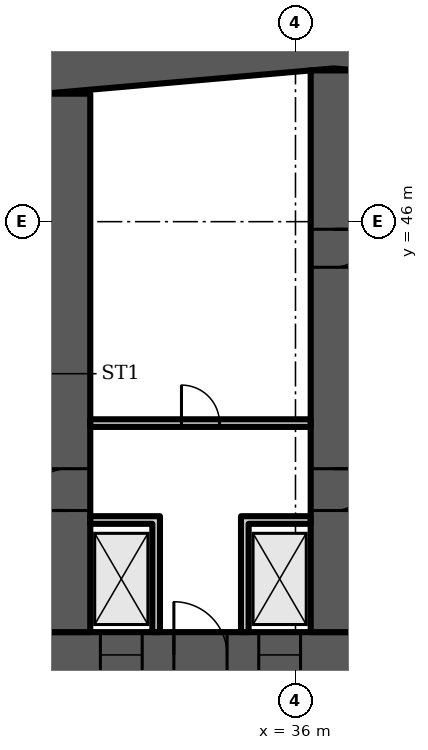
"""IFC4 building model, lengths in metres.
Left out: names, types, materials, properties, quantities, classifications, styles, units other than length and angle.
Written with IfcOpenShell. Run it as: python <this file> out.ifc"""

import sys

from ifc_helpers import new_model, si_unit, direction, frame, frame_2d, origin, place, context, subcontext, project, spatial, polyline, rectangle, outline, extrude, element, fill, save


model = new_model("IFC4")
c1 = context("Model", 3, precision=1e-05, world=origin(), true_north=direction((0.0, 1.0)))
c2 = subcontext(c1, "Body", "Model", "MODEL_VIEW")
j1 = project(units=[si_unit("LENGTHUNIT", "METRE"), si_unit("PLANEANGLEUNIT", "RADIAN")], contexts=[c1])
p1 = place(None, origin())
s1 = spatial("IfcSite", under=j1, at=p1, CompositionType="ELEMENT")
p2 = place(p1, origin())
s2 = spatial("IfcBuilding", under=s1, at=p2, CompositionType="ELEMENT")
p3 = place(p2, frame((0.0, 0.0, 45.1)))
s3 = spatial("IfcBuildingStorey", under=s2, at=p3, CompositionType="ELEMENT", Elevation=45.1)
p4 = place(p3, frame((0.0, 0.0, -0.0)))
e1 = element("IfcWall", 1, at=p4, inside=s3, PredefinedType="SHEAR", context=c2, shape_type="SweptSolid", body=[
    extrude(outline(polyline([(9.0, 47.583), (37.0, 50.032), (65.0, 47.583), (65.0, 48.787), (37.0, 51.237), (9.0, 48.787), (9.0, 47.583)])), origin(), (0.0, 0.0, 1.0), 3.6),
])
p5 = place(p3, frame((9.0, 34.6, 0.0), z_axis=(0.0, 0.0, 1.0), x_axis=(1.0, 0.0, 0.0)))
e2 = element("IfcWall", 2, at=p5, inside=s3, PredefinedType="SHEAR", context=c2, shape_type="SweptSolid", body=[
    extrude(rectangle(XDim=56.0, YDim=1.2, at=frame_2d((28.0, 0.0))), origin(), (0.0, 0.0, 1.0), 3.6),
])
p6 = place(p5, frame((2.0, 0.0, 0.0)))
e3 = element("IfcOpeningElement", 3, at=p6, cuts=e2, PredefinedType="OPENING", context=c2, shape_type="SweptSolid", body=[
    extrude(rectangle(XDim=1.0, YDim=2.1, at=frame_2d((0.5, 1.05))), frame((0.0, 0.61, 0.0), z_axis=(0.0, -1.0, 0.0), x_axis=(1.0, 0.0, 0.0)), (0.0, 0.0, 1.0), 1.22),
])
p7 = place(p5, frame((4.6, 0.0, 0.0)))
e4 = element("IfcOpeningElement", 4, at=p7, cuts=e2, PredefinedType="OPENING", context=c2, shape_type="SweptSolid", body=[
    extrude(rectangle(XDim=1.0, YDim=2.1, at=frame_2d((0.5, 1.05))), frame((0.0, 0.61, 0.0), z_axis=(0.0, -1.0, 0.0), x_axis=(1.0, 0.0, 0.0)), (0.0, 0.0, 1.0), 1.22),
])
p8 = place(p5, frame((7.867, 0.0, 0.0)))
e5 = element("IfcOpeningElement", 5, at=p8, cuts=e2, PredefinedType="OPENING", context=c2, shape_type="SweptSolid", body=[
    extrude(rectangle(XDim=1.1, YDim=2.1, at=frame_2d((0.55, 1.05))), frame((0.0, 0.61, 0.0), z_axis=(0.0, -1.0, 0.0), x_axis=(1.0, 0.0, 0.0)), (0.0, 0.0, 1.0), 1.22),
])
p9 = place(p5, frame((12.033, 0.0, 0.0)))
e6 = element("IfcOpeningElement", 6, at=p9, cuts=e2, PredefinedType="OPENING", context=c2, shape_type="SweptSolid", body=[
    extrude(rectangle(XDim=1.1, YDim=2.1, at=frame_2d((0.55, 1.05))), frame((0.0, 0.61, 0.0), z_axis=(0.0, -1.0, 0.0), x_axis=(1.0, 0.0, 0.0)), (0.0, 0.0, 1.0), 1.22),
])
p10 = place(p5, frame((9.8, 0.0, 0.0)))
e7 = element("IfcOpeningElement", 7, at=p10, cuts=e2, PredefinedType="OPENING", context=c2, shape_type="SweptSolid", body=[
    extrude(rectangle(XDim=1.4, YDim=2.1, at=frame_2d((0.7, 1.05))), frame((0.0, 0.61, 0.0), z_axis=(0.0, -1.0, 0.0), x_axis=(1.0, 0.0, 0.0)), (0.0, 0.0, 1.0), 1.22),
])
p11 = place(p5, frame((14.65, 0.0, 0.0)))
e8 = element("IfcOpeningElement", 8, at=p11, cuts=e2, PredefinedType="OPENING", context=c2, shape_type="SweptSolid", body=[
    extrude(rectangle(XDim=1.2, YDim=2.1, at=frame_2d((0.6, 1.05))), frame((0.0, 0.61, 0.0), z_axis=(0.0, -1.0, 0.0), x_axis=(1.0, 0.0, 0.0)), (0.0, 0.0, 1.0), 1.22),
])
p12 = place(p5, frame((21.867, 0.0, 0.0)))
e9 = element("IfcOpeningElement", 9, at=p12, cuts=e2, PredefinedType="OPENING", context=c2, shape_type="SweptSolid", body=[
    extrude(rectangle(XDim=1.1, YDim=2.1, at=frame_2d((0.55, 1.05))), frame((0.0, 0.61, 0.0), z_axis=(0.0, -1.0, 0.0), x_axis=(1.0, 0.0, 0.0)), (0.0, 0.0, 1.0), 1.22),
])
p13 = place(p5, frame((26.033, 0.0, 0.0)))
e10 = element("IfcOpeningElement", 10, at=p13, cuts=e2, PredefinedType="OPENING", context=c2, shape_type="SweptSolid", body=[
    extrude(rectangle(XDim=1.1, YDim=2.1, at=frame_2d((0.55, 1.05))), frame((0.0, 0.61, 0.0), z_axis=(0.0, -1.0, 0.0), x_axis=(1.0, 0.0, 0.0)), (0.0, 0.0, 1.0), 1.22),
])
p14 = place(p5, frame((23.8, 0.0, 0.0)))
e11 = element("IfcOpeningElement", 11, at=p14, cuts=e2, PredefinedType="OPENING", context=c2, shape_type="SweptSolid", body=[
    extrude(rectangle(XDim=1.4, YDim=2.1, at=frame_2d((0.7, 1.05))), frame((0.0, 0.61, 0.0), z_axis=(0.0, -1.0, 0.0), x_axis=(1.0, 0.0, 0.0)), (0.0, 0.0, 1.0), 1.22),
])
p15 = place(p5, frame((28.867, 0.0, 0.0)))
e12 = element("IfcOpeningElement", 12, at=p15, cuts=e2, PredefinedType="OPENING", context=c2, shape_type="SweptSolid", body=[
    extrude(rectangle(XDim=1.1, YDim=2.1, at=frame_2d((0.55, 1.05))), frame((0.0, 0.61, 0.0), z_axis=(0.0, -1.0, 0.0), x_axis=(1.0, 0.0, 0.0)), (0.0, 0.0, 1.0), 1.22),
])
p16 = place(p5, frame((33.033, 0.0, 0.0)))
e13 = element("IfcOpeningElement", 13, at=p16, cuts=e2, PredefinedType="OPENING", context=c2, shape_type="SweptSolid", body=[
    extrude(rectangle(XDim=1.1, YDim=2.1, at=frame_2d((0.55, 1.05))), frame((0.0, 0.61, 0.0), z_axis=(0.0, -1.0, 0.0), x_axis=(1.0, 0.0, 0.0)), (0.0, 0.0, 1.0), 1.22),
])
p17 = place(p5, frame((40.15, 0.0, 0.0)))
e14 = element("IfcOpeningElement", 14, at=p17, cuts=e2, PredefinedType="OPENING", context=c2, shape_type="SweptSolid", body=[
    extrude(rectangle(XDim=1.2, YDim=2.1, at=frame_2d((0.6, 1.05))), frame((0.0, 0.61, 0.0), z_axis=(0.0, -1.0, 0.0), x_axis=(1.0, 0.0, 0.0)), (0.0, 0.0, 1.0), 1.22),
])
p18 = place(p5, frame((44.8, 0.0, 0.0)))
e15 = element("IfcOpeningElement", 15, at=p18, cuts=e2, PredefinedType="OPENING", context=c2, shape_type="SweptSolid", body=[
    extrude(rectangle(XDim=1.4, YDim=2.1, at=frame_2d((0.7, 1.05))), frame((0.0, 0.61, 0.0), z_axis=(0.0, -1.0, 0.0), x_axis=(1.0, 0.0, 0.0)), (0.0, 0.0, 1.0), 1.22),
])
p19 = place(p5, frame((49.867, 0.0, 0.0)))
e16 = element("IfcOpeningElement", 16, at=p19, cuts=e2, PredefinedType="OPENING", context=c2, shape_type="SweptSolid", body=[
    extrude(rectangle(XDim=1.1, YDim=2.1, at=frame_2d((0.55, 1.05))), frame((0.0, 0.61, 0.0), z_axis=(0.0, -1.0, 0.0), x_axis=(1.0, 0.0, 0.0)), (0.0, 0.0, 1.0), 1.22),
])
p20 = place(p5, frame((53.5, 0.0, 0.0)))
e17 = element("IfcOpeningElement", 17, at=p20, cuts=e2, PredefinedType="OPENING", context=c2, shape_type="SweptSolid", body=[
    extrude(rectangle(XDim=1.1, YDim=2.1, at=frame_2d((0.55, 1.05))), frame((0.0, 0.61, 0.0), z_axis=(0.0, -1.0, 0.0), x_axis=(1.0, 0.0, 0.0)), (0.0, 0.0, 1.0), 1.22),
])
p21 = place(p5, frame((51.567, 0.0, 0.0)))
e18 = element("IfcOpeningElement", 18, at=p21, cuts=e2, PredefinedType="OPENING", context=c2, shape_type="SweptSolid", body=[
    extrude(rectangle(XDim=1.4, YDim=2.1, at=frame_2d((0.7, 1.05))), frame((0.0, 0.61, 0.0), z_axis=(0.0, -1.0, 0.0), x_axis=(1.0, 0.0, 0.0)), (0.0, 0.0, 1.0), 1.22),
])
p22 = place(p3, frame((30.0, 35.2, 0.0), z_axis=(0.0, 0.0, 1.0), x_axis=(0.0, 1.0, 0.0)))
e19 = element("IfcWall", 19, at=p22, inside=s3, PredefinedType="SHEAR", context=c2, shape_type="SweptSolid", body=[
    extrude(rectangle(XDim=14.168, YDim=1.2, at=frame_2d((7.084, 0.0))), origin(), (0.0, 0.0, 1.0), 3.6),
])
p23 = place(p22, frame((3.2, 0.0, 0.0)))
e20 = element("IfcOpeningElement", 20, at=p23, cuts=e19, PredefinedType="OPENING", context=c2, shape_type="SweptSolid", body=[
    extrude(rectangle(XDim=1.1, YDim=2.1, at=frame_2d((0.55, 1.05))), frame((0.0, 0.61, 0.0), z_axis=(0.0, -1.0, 0.0), x_axis=(1.0, 0.0, 0.0)), (0.0, 0.0, 1.0), 1.22),
])
p24 = place(p3, frame((37.0, 35.2, 0.0), z_axis=(0.0, 0.0, 1.0), x_axis=(0.0, 1.0, 0.0)))
e21 = element("IfcWall", 21, at=p24, inside=s3, PredefinedType="SHEAR", context=c2, shape_type="SweptSolid", body=[
    extrude(rectangle(XDim=14.78, YDim=1.2, at=frame_2d((7.39, 0.0))), origin(), (0.0, 0.0, 1.0), 3.6),
])
p25 = place(p24, frame((3.2, 0.0, 0.0)))
e22 = element("IfcOpeningElement", 22, at=p25, cuts=e21, PredefinedType="OPENING", context=c2, shape_type="SweptSolid", body=[
    extrude(rectangle(XDim=1.1, YDim=2.1, at=frame_2d((0.55, 1.05))), frame((0.0, 0.61, 0.0), z_axis=(0.0, -1.0, 0.0), x_axis=(1.0, 0.0, 0.0)), (0.0, 0.0, 1.0), 1.22),
])
p26 = place(p24, frame((9.6, 0.0, 0.0)))
e23 = element("IfcOpeningElement", 23, at=p26, cuts=e21, PredefinedType="OPENING", context=c2, shape_type="SweptSolid", body=[
    extrude(rectangle(XDim=1.0, YDim=2.1, at=frame_2d((0.5, 1.05))), frame((0.0, 0.61, 0.0), z_axis=(0.0, -1.0, 0.0), x_axis=(1.0, 0.0, 0.0)), (0.0, 0.0, 1.0), 1.22),
])
p27 = place(p3, frame((30.6, 40.7, 0.0), z_axis=(0.0, 0.0, 1.0), x_axis=(1.0, 0.0, 0.0)))
e24 = element("IfcWall", 24, at=p27, inside=s3, PredefinedType="PARTITIONING", context=c2, shape_type="SweptSolid", body=[
    extrude(rectangle(XDim=5.8, YDim=0.2, at=frame_2d((2.9, 0.0))), origin(), (0.0, 0.0, 1.0), 3.2),
])
p28 = place(p27, frame((2.4, 0.0, 0.0)))
e25 = element("IfcOpeningElement", 25, at=p28, cuts=e24, PredefinedType="OPENING", context=c2, shape_type="SweptSolid", body=[
    extrude(rectangle(XDim=1.0, YDim=2.1, at=frame_2d((0.5, 1.05))), frame((0.0, 0.11, 0.0), z_axis=(0.0, -1.0, 0.0), x_axis=(1.0, 0.0, 0.0)), (0.0, 0.0, 1.0), 0.22),
])
p29 = place(p3, frame((0.0, 0.0, -0.0)))
e26 = element("IfcWall", 26, at=p29, inside=s3, PredefinedType="PARTITIONING", context=c2, shape_type="SweptSolid", body=[
    extrude(outline(polyline([(32.233, 38.05), (30.6, 38.05), (30.6, 38.25), (32.233, 38.25), (32.433, 38.25), (32.433, 35.2), (32.233, 35.2), (32.233, 38.05)])), origin(), (0.0, 0.0, 1.0), 3.2),
])
p30 = place(p3, frame((0.0, 0.0, -0.0)))
e27 = element("IfcWall", 27, at=p30, inside=s3, PredefinedType="PARTITIONING", context=c2, shape_type="SweptSolid", body=[
    extrude(outline(polyline([(34.567, 38.25), (34.767, 38.25), (36.4, 38.25), (36.4, 38.05), (34.767, 38.05), (34.767, 35.2), (34.567, 35.2), (34.567, 38.25)])), origin(), (0.0, 0.0, 1.0), 3.2),
])
p31 = place(p12, origin())
e28 = element("IfcDoor", 28, at=p31, inside=s3, OperationType="DOUBLE_DOOR_SLIDING", PredefinedType="DOOR", context=c2, shape_type="SweptSolid", body=[
    extrude(rectangle(XDim=1.1, YDim=2.1, at=frame_2d((0.55, 1.05))), frame((0.0, 0.025, 0.0), z_axis=(0.0, -1.0, 0.0), x_axis=(1.0, 0.0, 0.0)), (0.0, 0.0, 1.0), 0.05),
])
fill(e9, e28)
p32 = place(p13, origin())
e29 = element("IfcDoor", 29, at=p32, inside=s3, OperationType="DOUBLE_DOOR_SLIDING", PredefinedType="DOOR", context=c2, shape_type="SweptSolid", body=[
    extrude(rectangle(XDim=1.1, YDim=2.1, at=frame_2d((0.55, 1.05))), frame((0.0, 0.025, 0.0), z_axis=(0.0, -1.0, 0.0), x_axis=(1.0, 0.0, 0.0)), (0.0, 0.0, 1.0), 0.05),
])
fill(e10, e29)
p33 = place(p14, origin())
e30 = element("IfcDoor", 30, at=p33, inside=s3, OperationType="DOUBLE_DOOR_SINGLE_SWING", PredefinedType="DOOR", context=c2, shape_type="SweptSolid", body=[
    extrude(rectangle(XDim=1.4, YDim=2.1, at=frame_2d((0.7, 1.05))), frame((0.0, 0.025, 0.0), z_axis=(0.0, -1.0, 0.0), x_axis=(1.0, 0.0, 0.0)), (0.0, 0.0, 1.0), 0.05),
])
fill(e11, e30)
p34 = place(p28, origin())
e31 = element("IfcDoor", 31, at=p34, inside=s3, OperationType="SINGLE_SWING_LEFT", PredefinedType="DOOR", context=c2, shape_type="SweptSolid", body=[
    extrude(rectangle(XDim=1.0, YDim=2.1, at=frame_2d((0.5, 1.05))), frame((0.0, 0.025, 0.0), z_axis=(0.0, -1.0, 0.0), x_axis=(1.0, 0.0, 0.0)), (0.0, 0.0, 1.0), 0.05),
])
fill(e25, e31)
p35 = place(p23, origin())
e32 = element("IfcDoor", 32, at=p35, inside=s3, OperationType="SINGLE_SWING_LEFT", PredefinedType="DOOR", context=c2, shape_type="SweptSolid", body=[
    extrude(rectangle(XDim=1.1, YDim=2.1, at=frame_2d((0.55, 1.05))), frame((0.0, 0.025, 0.0), z_axis=(0.0, -1.0, 0.0), x_axis=(1.0, 0.0, 0.0)), (0.0, 0.0, 1.0), 0.05),
])
fill(e20, e32)
p36 = place(p25, origin())
e33 = element("IfcDoor", 33, at=p36, inside=s3, OperationType="SINGLE_SWING_RIGHT", PredefinedType="DOOR", context=c2, shape_type="SweptSolid", body=[
    extrude(rectangle(XDim=1.1, YDim=2.1, at=frame_2d((0.55, 1.05))), frame((0.0, 0.025, 0.0), z_axis=(0.0, -1.0, 0.0), x_axis=(1.0, 0.0, 0.0)), (0.0, 0.0, 1.0), 0.05),
])
fill(e22, e33)
p37 = place(p26, origin())
e34 = element("IfcDoor", 34, at=p37, inside=s3, OperationType="SINGLE_SWING_RIGHT", PredefinedType="DOOR", context=c2, shape_type="SweptSolid", body=[
    extrude(rectangle(XDim=1.0, YDim=2.1, at=frame_2d((0.5, 1.05))), frame((0.0, 0.6, 0.0), z_axis=(0.0, -1.0, 0.0), x_axis=(1.0, 0.0, 0.0)), (0.0, 0.0, 1.0), 1.199),
])
fill(e23, e34)
save(model, sys.argv[1])
